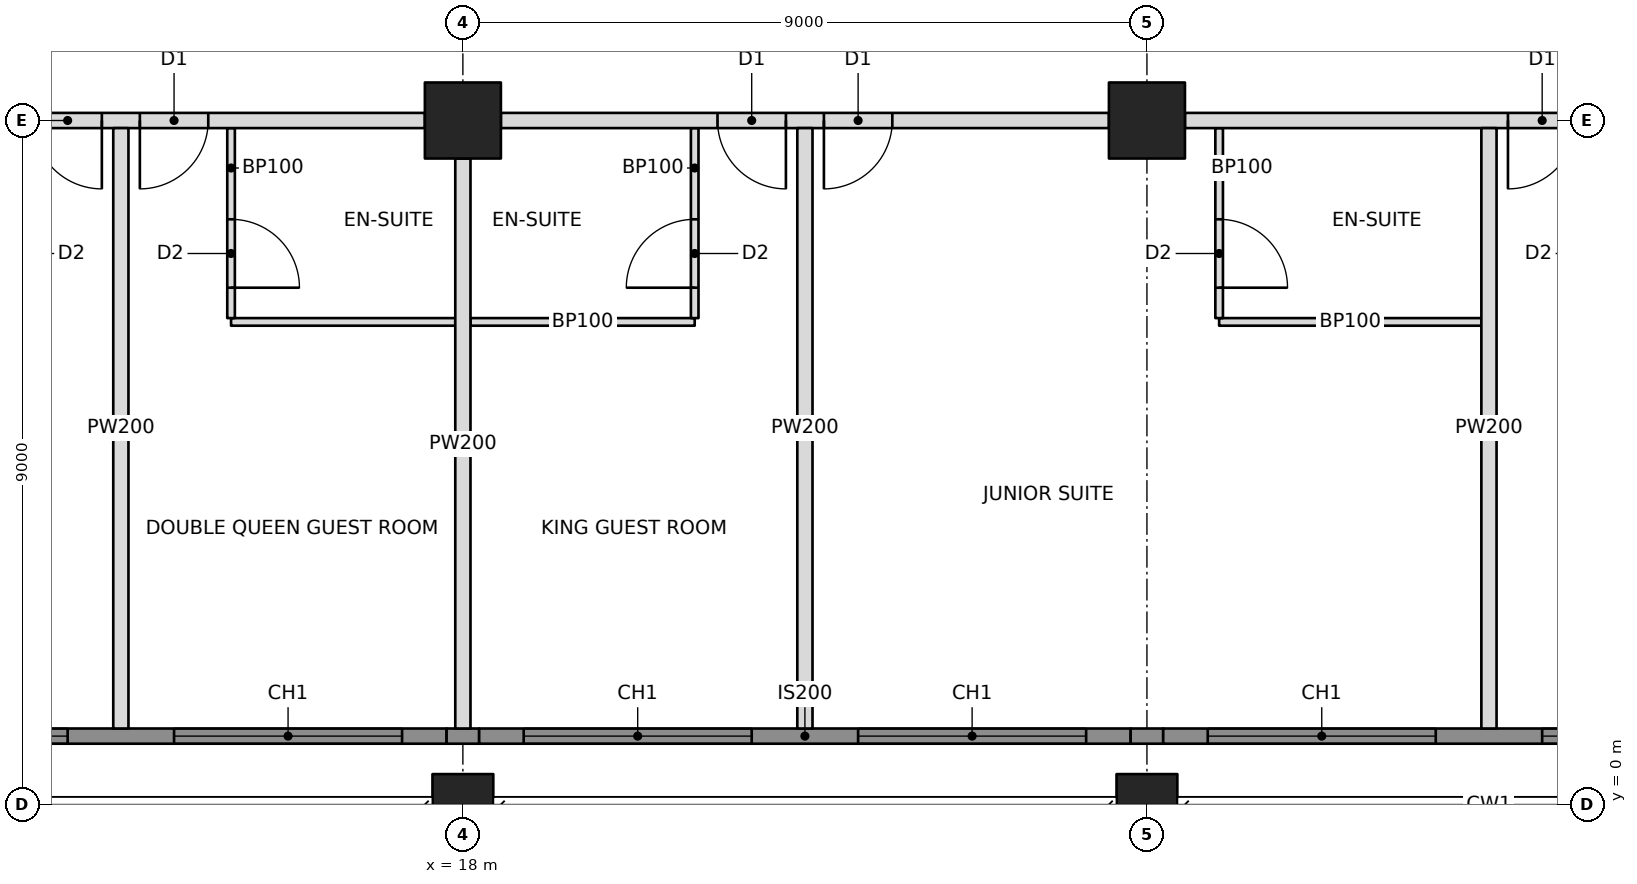
"""IFC4 building model, lengths in metres.
Left out: names, types, materials, properties, quantities, classifications, styles, units other than length and angle.
Written with IfcOpenShell. Run it as: python <this file> out.ifc"""

import sys

from ifc_helpers import new_model, si_unit, direction, frame, frame_2d, origin, origin_2d, place, context, subcontext, project, spatial, rectangle, hollow_rectangle, extrude, element, fill, save


model = new_model("IFC4")
c1 = context("Model", 3, precision=1e-05, world=origin(), true_north=direction((0.0, 1.0)))
c2 = subcontext(c1, "Body", "Model", "MODEL_VIEW")
j1 = project(units=[si_unit("LENGTHUNIT", "METRE"), si_unit("PLANEANGLEUNIT", "RADIAN")], contexts=[c1])
p1 = place(None, origin())
s1 = spatial("IfcSite", under=j1, at=p1, CompositionType="ELEMENT")
p2 = place(p1, origin())
s2 = spatial("IfcBuilding", under=s1, at=p2, CompositionType="ELEMENT")
p3 = place(p2, frame((0.0, 0.0, 85.8)))
s3 = spatial("IfcBuildingStorey", under=s2, at=p3, CompositionType="ELEMENT", Elevation=85.8)
p4 = place(p3, frame((18.0, 0.0, 0.0), z_axis=(0.0, 0.0, 1.0), x_axis=(1.0, 0.0, 0.0)))
e1 = element("IfcColumn", 1, at=p4, inside=s3, PredefinedType="COLUMN", context=c2, shape_type="SweptSolid", body=[
    extrude(hollow_rectangle(XDim=0.8, YDim=0.8, WallThickness=0.07, at=origin_2d()), origin(), (0.0, 0.0, 1.0), 3.4),
])
p5 = place(p3, frame((18.0, 9.0, 0.0), z_axis=(0.0, 0.0, 1.0), x_axis=(1.0, 0.0, 0.0)))
e2 = element("IfcColumn", 2, at=p5, inside=s3, PredefinedType="COLUMN", context=c2, shape_type="SweptSolid", body=[
    extrude(hollow_rectangle(XDim=1.0, YDim=1.0, WallThickness=0.1, at=origin_2d()), origin(), (0.0, 0.0, 1.0), 3.4),
])
p6 = place(p3, frame((27.0, 0.0, 0.0), z_axis=(0.0, 0.0, 1.0), x_axis=(1.0, 0.0, 0.0)))
e3 = element("IfcColumn", 3, at=p6, inside=s3, PredefinedType="COLUMN", context=c2, shape_type="SweptSolid", body=[
    extrude(hollow_rectangle(XDim=0.8, YDim=0.8, WallThickness=0.07, at=origin_2d()), origin(), (0.0, 0.0, 1.0), 3.4),
])
p7 = place(p3, frame((27.0, 9.0, 0.0), z_axis=(0.0, 0.0, 1.0), x_axis=(1.0, 0.0, 0.0)))
e4 = element("IfcColumn", 4, at=p7, inside=s3, PredefinedType="COLUMN", context=c2, shape_type="SweptSolid", body=[
    extrude(hollow_rectangle(XDim=1.0, YDim=1.0, WallThickness=0.1, at=origin_2d()), origin(), (0.0, 0.0, 1.0), 3.4),
])
p8 = place(p3, frame((9.5, 9.0, 0.0), z_axis=(0.0, 0.0, 1.0), x_axis=(1.0, 0.0, 0.0)))
e5 = element("IfcWall", 5, at=p8, inside=s3, PredefinedType="PARTITIONING", context=c2, shape_type="SweptSolid", body=[
    extrude(rectangle(XDim=8.0, YDim=0.2, at=frame_2d((4.0, 0.0))), origin(), (0.0, 0.0, 1.0), 2.21),
])
p9 = place(p8, frame((2.85, 0.0, 0.0)))
e6 = element("IfcOpeningElement", 6, at=p9, cuts=e5, PredefinedType="OPENING", context=c2, shape_type="SweptSolid", body=[
    extrude(rectangle(XDim=0.9, YDim=2.1, at=frame_2d((0.45, 1.05))), frame((0.0, 0.11, 0.0), z_axis=(0.0, -1.0, 0.0), x_axis=(1.0, 0.0, 0.0)), (0.0, 0.0, 1.0), 0.22),
])
p10 = place(p8, frame((4.25, 0.0, 0.0)))
e7 = element("IfcOpeningElement", 7, at=p10, cuts=e5, PredefinedType="OPENING", context=c2, shape_type="SweptSolid", body=[
    extrude(rectangle(XDim=0.9, YDim=2.1, at=frame_2d((0.45, 1.05))), frame((0.0, 0.11, 0.0), z_axis=(0.0, -1.0, 0.0), x_axis=(1.0, 0.0, 0.0)), (0.0, 0.0, 1.0), 0.22),
])
p11 = place(p3, frame((18.5, 9.0, 0.0), z_axis=(0.0, 0.0, 1.0), x_axis=(1.0, 0.0, 0.0)))
e8 = element("IfcWall", 8, at=p11, inside=s3, PredefinedType="PARTITIONING", context=c2, shape_type="SweptSolid", body=[
    extrude(rectangle(XDim=8.0, YDim=0.2, at=frame_2d((4.0, 0.0))), origin(), (0.0, 0.0, 1.0), 2.21),
])
p12 = place(p11, frame((2.85, 0.0, 0.0)))
e9 = element("IfcOpeningElement", 9, at=p12, cuts=e8, PredefinedType="OPENING", context=c2, shape_type="SweptSolid", body=[
    extrude(rectangle(XDim=0.9, YDim=2.1, at=frame_2d((0.45, 1.05))), frame((0.0, 0.11, 0.0), z_axis=(0.0, -1.0, 0.0), x_axis=(1.0, 0.0, 0.0)), (0.0, 0.0, 1.0), 0.22),
])
p13 = place(p11, frame((4.25, 0.0, 0.0)))
e10 = element("IfcOpeningElement", 10, at=p13, cuts=e8, PredefinedType="OPENING", context=c2, shape_type="SweptSolid", body=[
    extrude(rectangle(XDim=0.9, YDim=2.1, at=frame_2d((0.45, 1.05))), frame((0.0, 0.11, 0.0), z_axis=(0.0, -1.0, 0.0), x_axis=(1.0, 0.0, 0.0)), (0.0, 0.0, 1.0), 0.22),
])
p14 = place(p3, frame((27.5, 9.0, 0.0), z_axis=(0.0, 0.0, 1.0), x_axis=(1.0, 0.0, 0.0)))
e11 = element("IfcWall", 11, at=p14, inside=s3, PredefinedType="PARTITIONING", context=c2, shape_type="SweptSolid", body=[
    extrude(rectangle(XDim=8.0, YDim=0.2, at=frame_2d((4.0, 0.0))), origin(), (0.0, 0.0, 1.0), 2.21),
])
p15 = place(p14, frame((4.25, 0.0, 0.0)))
e12 = element("IfcOpeningElement", 12, at=p15, cuts=e11, PredefinedType="OPENING", context=c2, shape_type="SweptSolid", body=[
    extrude(rectangle(XDim=0.9, YDim=2.1, at=frame_2d((0.45, 1.05))), frame((0.0, 0.11, 0.0), z_axis=(0.0, -1.0, 0.0), x_axis=(1.0, 0.0, 0.0)), (0.0, 0.0, 1.0), 0.22),
])
p16 = place(p3, frame((13.5, 8.9, 0.0), z_axis=(0.0, 0.0, 1.0), x_axis=(0.0, -1.0, 0.0)))
e13 = element("IfcWall", 13, at=p16, inside=s3, PredefinedType="PARTITIONING", context=c2, shape_type="SweptSolid", body=[
    extrude(rectangle(XDim=7.9, YDim=0.2, at=frame_2d((3.95, 0.0))), origin(), (0.0, 0.0, 1.0), 2.21),
])
p17 = place(p3, frame((18.0, 8.5, 0.0), z_axis=(0.0, 0.0, 1.0), x_axis=(0.0, -1.0, 0.0)))
e14 = element("IfcWall", 14, at=p17, inside=s3, PredefinedType="PARTITIONING", context=c2, shape_type="SweptSolid", body=[
    extrude(rectangle(XDim=7.5, YDim=0.2, at=frame_2d((3.75, 0.0))), origin(), (0.0, 0.0, 1.0), 2.203),
])
for number, where, z_axis, x_axis in (
    (15, (22.5, 8.9, 0.0), (0.0, 0.0, 1.0), (0.0, -1.0, 0.0)),
    (16, (31.5, 8.9, 0.0), (0.0, 0.0, 1.0), (0.0, -1.0, 0.0)),
):
    element("IfcWall", number, at=place(p3, frame(where, z_axis=z_axis, x_axis=x_axis)), inside=s3, PredefinedType="PARTITIONING", context=c2, shape_type="SweptSolid", body=[
        extrude(rectangle(XDim=7.9, YDim=0.2, at=frame_2d((3.95, 0.0))), origin(), (0.0, 0.0, 1.0), 2.21),
    ])
p18 = place(p3, frame((14.95, 6.35, 0.0), z_axis=(0.0, 0.0, 1.0), x_axis=(1.0, 0.0, 0.0)))
e17 = element("IfcWall", 17, at=p18, inside=s3, PredefinedType="PARTITIONING", context=c2, shape_type="SweptSolid", body=[
    extrude(rectangle(XDim=2.95, YDim=0.1, at=frame_2d((1.475, 0.0))), origin(), (0.0, 0.0, 1.0), 2.202),
])
p19 = place(p3, frame((14.95, 8.9, 0.0), z_axis=(0.0, 0.0, 1.0), x_axis=(0.0, -1.0, 0.0)))
e18 = element("IfcWall", 18, at=p19, inside=s3, PredefinedType="PARTITIONING", context=c2, shape_type="SweptSolid", body=[
    extrude(rectangle(XDim=2.5, YDim=0.1, at=frame_2d((1.25, 0.0))), origin(), (0.0, 0.0, 1.0), 2.21),
])
p20 = place(p19, frame((1.2, 0.0, 0.0)))
e19 = element("IfcOpeningElement", 19, at=p20, cuts=e18, PredefinedType="OPENING", context=c2, shape_type="SweptSolid", body=[
    extrude(rectangle(XDim=0.9, YDim=2.1, at=frame_2d((0.45, 1.05))), frame((0.0, 0.06, 0.0), z_axis=(0.0, -1.0, 0.0), x_axis=(1.0, 0.0, 0.0)), (0.0, 0.0, 1.0), 0.12),
])
p21 = place(p3, frame((18.1, 6.35, 0.0), z_axis=(0.0, 0.0, 1.0), x_axis=(1.0, 0.0, 0.0)))
e20 = element("IfcWall", 20, at=p21, inside=s3, PredefinedType="PARTITIONING", context=c2, shape_type="SweptSolid", body=[
    extrude(rectangle(XDim=2.95, YDim=0.1, at=frame_2d((1.475, 0.0))), origin(), (0.0, 0.0, 1.0), 2.202),
])
p22 = place(p3, frame((21.05, 8.9, 0.0), z_axis=(0.0, 0.0, 1.0), x_axis=(0.0, -1.0, 0.0)))
e21 = element("IfcWall", 21, at=p22, inside=s3, PredefinedType="PARTITIONING", context=c2, shape_type="SweptSolid", body=[
    extrude(rectangle(XDim=2.5, YDim=0.1, at=frame_2d((1.25, 0.0))), origin(), (0.0, 0.0, 1.0), 2.21),
])
p23 = place(p22, frame((1.2, 0.0, 0.0)))
e22 = element("IfcOpeningElement", 22, at=p23, cuts=e21, PredefinedType="OPENING", context=c2, shape_type="SweptSolid", body=[
    extrude(rectangle(XDim=0.9, YDim=2.1, at=frame_2d((0.45, 1.05))), frame((0.0, 0.06, 0.0), z_axis=(0.0, -1.0, 0.0), x_axis=(1.0, 0.0, 0.0)), (0.0, 0.0, 1.0), 0.12),
])
p24 = place(p3, frame((27.95, 6.35, 0.0), z_axis=(0.0, 0.0, 1.0), x_axis=(1.0, 0.0, 0.0)))
e23 = element("IfcWall", 23, at=p24, inside=s3, PredefinedType="PARTITIONING", context=c2, shape_type="SweptSolid", body=[
    extrude(rectangle(XDim=3.45, YDim=0.1, at=frame_2d((1.725, 0.0))), origin(), (0.0, 0.0, 1.0), 3.15),
])
p25 = place(p3, frame((27.95, 8.9, 0.0), z_axis=(0.0, 0.0, 1.0), x_axis=(0.0, -1.0, 0.0)))
e24 = element("IfcWall", 24, at=p25, inside=s3, PredefinedType="PARTITIONING", context=c2, shape_type="SweptSolid", body=[
    extrude(rectangle(XDim=2.5, YDim=0.1, at=frame_2d((1.25, 0.0))), origin(), (0.0, 0.0, 1.0), 2.21),
])
p26 = place(p25, frame((1.2, 0.0, 0.0)))
e25 = element("IfcOpeningElement", 25, at=p26, cuts=e24, PredefinedType="OPENING", context=c2, shape_type="SweptSolid", body=[
    extrude(rectangle(XDim=0.9, YDim=2.1, at=frame_2d((0.45, 1.05))), frame((0.0, 0.06, 0.0), z_axis=(0.0, -1.0, 0.0), x_axis=(1.0, 0.0, 0.0)), (0.0, 0.0, 1.0), 0.12),
])
p27 = place(p3, frame((9.215, 0.9, 0.0), z_axis=(0.0, 0.0, 1.0), x_axis=(1.0, 0.0, 0.0)))
e26 = element("IfcWall", 26, at=p27, inside=s3, PredefinedType="SOLIDWALL", context=c2, shape_type="SweptSolid", body=[
    extrude(rectangle(XDim=8.571, YDim=0.2, at=frame_2d((4.285, 0.0))), origin(), (0.0, 0.0, 1.0), 3.15),
])
p28 = place(p27, frame((0.585, 0.0, 0.6)))
e27 = element("IfcOpeningElement", 27, at=p28, cuts=e26, PredefinedType="OPENING", context=c2, shape_type="SweptSolid", body=[
    extrude(rectangle(XDim=3.0, YDim=2.2, at=frame_2d((1.5, 1.1))), frame((0.0, 0.11, 0.0), z_axis=(0.0, -1.0, 0.0), x_axis=(1.0, 0.0, 0.0)), (0.0, 0.0, 1.0), 0.22),
])
p29 = place(p27, frame((4.985, 0.0, 0.6)))
e28 = element("IfcOpeningElement", 28, at=p29, cuts=e26, PredefinedType="OPENING", context=c2, shape_type="SweptSolid", body=[
    extrude(rectangle(XDim=3.0, YDim=2.2, at=frame_2d((1.5, 1.1))), frame((0.0, 0.11, 0.0), z_axis=(0.0, -1.0, 0.0), x_axis=(1.0, 0.0, 0.0)), (0.0, 0.0, 1.0), 0.22),
])
p30 = place(p3, frame((17.786, 0.9, 0.0), z_axis=(0.0, 0.0, 1.0), x_axis=(1.0, 0.0, 0.0)))
e29 = element("IfcWall", 29, at=p30, inside=s3, PredefinedType="SOLIDWALL", context=c2, shape_type="SweptSolid", body=[
    extrude(rectangle(XDim=0.428, YDim=0.2, at=frame_2d((0.214, 0.0))), origin(), (0.0, 0.0, 1.0), 2.202),
])
p31 = place(p3, frame((18.214, 0.9, 0.0), z_axis=(0.0, 0.0, 1.0), x_axis=(1.0, 0.0, 0.0)))
e30 = element("IfcWall", 30, at=p31, inside=s3, PredefinedType="SOLIDWALL", context=c2, shape_type="SweptSolid", body=[
    extrude(rectangle(XDim=8.572, YDim=0.2, at=frame_2d((4.286, 0.0))), origin(), (0.0, 0.0, 1.0), 3.15),
])
p32 = place(p31, frame((0.586, 0.0, 0.6)))
e31 = element("IfcOpeningElement", 31, at=p32, cuts=e30, PredefinedType="OPENING", context=c2, shape_type="SweptSolid", body=[
    extrude(rectangle(XDim=3.0, YDim=2.2, at=frame_2d((1.5, 1.1))), frame((0.0, 0.11, 0.0), z_axis=(0.0, -1.0, 0.0), x_axis=(1.0, 0.0, 0.0)), (0.0, 0.0, 1.0), 0.22),
])
p33 = place(p31, frame((4.986, 0.0, 0.6)))
e32 = element("IfcOpeningElement", 32, at=p33, cuts=e30, PredefinedType="OPENING", context=c2, shape_type="SweptSolid", body=[
    extrude(rectangle(XDim=3.0, YDim=2.2, at=frame_2d((1.5, 1.1))), frame((0.0, 0.11, 0.0), z_axis=(0.0, -1.0, 0.0), x_axis=(1.0, 0.0, 0.0)), (0.0, 0.0, 1.0), 0.22),
])
p34 = place(p3, frame((26.786, 0.9, 0.0), z_axis=(0.0, 0.0, 1.0), x_axis=(1.0, 0.0, 0.0)))
e33 = element("IfcWall", 33, at=p34, inside=s3, PredefinedType="SOLIDWALL", context=c2, shape_type="SweptSolid", body=[
    extrude(rectangle(XDim=0.428, YDim=0.2, at=frame_2d((0.214, 0.0))), origin(), (0.0, 0.0, 1.0), 2.202),
])
p35 = place(p3, frame((27.214, 0.9, 0.0), z_axis=(0.0, 0.0, 1.0), x_axis=(1.0, 0.0, 0.0)))
e34 = element("IfcWall", 34, at=p35, inside=s3, PredefinedType="SOLIDWALL", context=c2, shape_type="SweptSolid", body=[
    extrude(rectangle(XDim=8.571, YDim=0.2, at=frame_2d((4.285, 0.0))), origin(), (0.0, 0.0, 1.0), 3.15),
])
p36 = place(p35, frame((0.586, 0.0, 0.6)))
e35 = element("IfcOpeningElement", 35, at=p36, cuts=e34, PredefinedType="OPENING", context=c2, shape_type="SweptSolid", body=[
    extrude(rectangle(XDim=3.0, YDim=2.2, at=frame_2d((1.5, 1.1))), frame((0.0, 0.11, 0.0), z_axis=(0.0, -1.0, 0.0), x_axis=(1.0, 0.0, 0.0)), (0.0, 0.0, 1.0), 0.22),
])
p37 = place(p35, frame((4.986, 0.0, 0.6)))
e36 = element("IfcOpeningElement", 36, at=p37, cuts=e34, PredefinedType="OPENING", context=c2, shape_type="SweptSolid", body=[
    extrude(rectangle(XDim=3.0, YDim=2.2, at=frame_2d((1.5, 1.1))), frame((0.0, 0.11, 0.0), z_axis=(0.0, -1.0, 0.0), x_axis=(1.0, 0.0, 0.0)), (0.0, 0.0, 1.0), 0.22),
])
p38 = place(p28, origin())
e37 = element("IfcWindow", 37, at=p38, inside=s3, PartitioningType="TRIPLE_PANEL_VERTICAL", PredefinedType="WINDOW", context=c2, shape_type="SweptSolid", body=[
    extrude(rectangle(XDim=3.0, YDim=2.2, at=frame_2d((1.5, 1.1))), frame((0.0, 0.03, 0.0), z_axis=(0.0, -1.0, 0.0), x_axis=(1.0, 0.0, 0.0)), (0.0, 0.0, 1.0), 0.06),
])
fill(e27, e37)
p39 = place(p29, origin())
e38 = element("IfcWindow", 38, at=p39, inside=s3, PartitioningType="TRIPLE_PANEL_VERTICAL", PredefinedType="WINDOW", context=c2, shape_type="SweptSolid", body=[
    extrude(rectangle(XDim=3.0, YDim=2.2, at=frame_2d((1.5, 1.1))), frame((0.0, 0.03, 0.0), z_axis=(0.0, -1.0, 0.0), x_axis=(1.0, 0.0, 0.0)), (0.0, 0.0, 1.0), 0.06),
])
fill(e28, e38)
p40 = place(p32, origin())
e39 = element("IfcWindow", 39, at=p40, inside=s3, PartitioningType="TRIPLE_PANEL_VERTICAL", PredefinedType="WINDOW", context=c2, shape_type="SweptSolid", body=[
    extrude(rectangle(XDim=3.0, YDim=2.2, at=frame_2d((1.5, 1.1))), frame((0.0, 0.03, 0.0), z_axis=(0.0, -1.0, 0.0), x_axis=(1.0, 0.0, 0.0)), (0.0, 0.0, 1.0), 0.06),
])
fill(e31, e39)
p41 = place(p33, origin())
e40 = element("IfcWindow", 40, at=p41, inside=s3, PartitioningType="TRIPLE_PANEL_VERTICAL", PredefinedType="WINDOW", context=c2, shape_type="SweptSolid", body=[
    extrude(rectangle(XDim=3.0, YDim=2.2, at=frame_2d((1.5, 1.1))), frame((0.0, 0.03, 0.0), z_axis=(0.0, -1.0, 0.0), x_axis=(1.0, 0.0, 0.0)), (0.0, 0.0, 1.0), 0.06),
])
fill(e32, e40)
p42 = place(p36, origin())
e41 = element("IfcWindow", 41, at=p42, inside=s3, PartitioningType="TRIPLE_PANEL_VERTICAL", PredefinedType="WINDOW", context=c2, shape_type="SweptSolid", body=[
    extrude(rectangle(XDim=3.0, YDim=2.2, at=frame_2d((1.5, 1.1))), frame((0.0, 0.03, 0.0), z_axis=(0.0, -1.0, 0.0), x_axis=(1.0, 0.0, 0.0)), (0.0, 0.0, 1.0), 0.06),
])
fill(e35, e41)
p43 = place(p37, origin())
e42 = element("IfcWindow", 42, at=p43, inside=s3, PartitioningType="TRIPLE_PANEL_VERTICAL", PredefinedType="WINDOW", context=c2, shape_type="SweptSolid", body=[
    extrude(rectangle(XDim=3.0, YDim=2.2, at=frame_2d((1.5, 1.1))), frame((0.0, 0.03, 0.0), z_axis=(0.0, -1.0, 0.0), x_axis=(1.0, 0.0, 0.0)), (0.0, 0.0, 1.0), 0.06),
])
fill(e36, e42)
p44 = place(p9, frame((0.9, 0.0, 0.0), z_axis=(0.0, 0.0, 1.0), x_axis=(-1.0, 0.0, 0.0)))
e43 = element("IfcDoor", 43, at=p44, inside=s3, OperationType="SINGLE_SWING_LEFT", PredefinedType="DOOR", context=c2, shape_type="SweptSolid", body=[
    extrude(rectangle(XDim=0.9, YDim=2.1, at=frame_2d((0.45, 1.05))), frame((0.0, 0.025, 0.0), z_axis=(0.0, -1.0, 0.0), x_axis=(1.0, 0.0, 0.0)), (0.0, 0.0, 1.0), 0.05),
])
fill(e6, e43)
p45 = place(p20, origin())
e44 = element("IfcDoor", 44, at=p45, inside=s3, OperationType="SINGLE_SWING_RIGHT", PredefinedType="DOOR", context=c2, shape_type="SweptSolid", body=[
    extrude(rectangle(XDim=0.9, YDim=2.1, at=frame_2d((0.45, 1.05))), frame((0.0, 0.025, 0.0), z_axis=(0.0, -1.0, 0.0), x_axis=(1.0, 0.0, 0.0)), (0.0, 0.0, 1.0), 0.05),
])
fill(e19, e44)
p46 = place(p10, frame((0.9, 0.0, 0.0), z_axis=(0.0, 0.0, 1.0), x_axis=(-1.0, 0.0, 0.0)))
e45 = element("IfcDoor", 45, at=p46, inside=s3, OperationType="SINGLE_SWING_RIGHT", PredefinedType="DOOR", context=c2, shape_type="SweptSolid", body=[
    extrude(rectangle(XDim=0.9, YDim=2.1, at=frame_2d((0.45, 1.05))), frame((0.0, 0.025, 0.0), z_axis=(0.0, -1.0, 0.0), x_axis=(1.0, 0.0, 0.0)), (0.0, 0.0, 1.0), 0.05),
])
fill(e7, e45)
p47 = place(p23, frame((0.9, 0.0, 0.0), z_axis=(0.0, 0.0, 1.0), x_axis=(-1.0, 0.0, 0.0)))
e46 = element("IfcDoor", 46, at=p47, inside=s3, OperationType="SINGLE_SWING_LEFT", PredefinedType="DOOR", context=c2, shape_type="SweptSolid", body=[
    extrude(rectangle(XDim=0.9, YDim=2.1, at=frame_2d((0.45, 1.05))), frame((0.0, 0.025, 0.0), z_axis=(0.0, -1.0, 0.0), x_axis=(1.0, 0.0, 0.0)), (0.0, 0.0, 1.0), 0.05),
])
fill(e22, e46)
p48 = place(p12, frame((0.9, 0.0, 0.0), z_axis=(0.0, 0.0, 1.0), x_axis=(-1.0, 0.0, 0.0)))
e47 = element("IfcDoor", 47, at=p48, inside=s3, OperationType="SINGLE_SWING_LEFT", PredefinedType="DOOR", context=c2, shape_type="SweptSolid", body=[
    extrude(rectangle(XDim=0.9, YDim=2.1, at=frame_2d((0.45, 1.05))), frame((0.0, 0.025, 0.0), z_axis=(0.0, -1.0, 0.0), x_axis=(1.0, 0.0, 0.0)), (0.0, 0.0, 1.0), 0.05),
])
fill(e9, e47)
p49 = place(p26, origin())
e48 = element("IfcDoor", 48, at=p49, inside=s3, OperationType="SINGLE_SWING_RIGHT", PredefinedType="DOOR", context=c2, shape_type="SweptSolid", body=[
    extrude(rectangle(XDim=0.9, YDim=2.1, at=frame_2d((0.45, 1.05))), frame((0.0, 0.025, 0.0), z_axis=(0.0, -1.0, 0.0), x_axis=(1.0, 0.0, 0.0)), (0.0, 0.0, 1.0), 0.05),
])
fill(e25, e48)
p50 = place(p13, frame((0.9, 0.0, 0.0), z_axis=(0.0, 0.0, 1.0), x_axis=(-1.0, 0.0, 0.0)))
e49 = element("IfcDoor", 49, at=p50, inside=s3, OperationType="SINGLE_SWING_RIGHT", PredefinedType="DOOR", context=c2, shape_type="SweptSolid", body=[
    extrude(rectangle(XDim=0.9, YDim=2.1, at=frame_2d((0.45, 1.05))), frame((0.0, 0.025, 0.0), z_axis=(0.0, -1.0, 0.0), x_axis=(1.0, 0.0, 0.0)), (0.0, 0.0, 1.0), 0.05),
])
fill(e10, e49)
p51 = place(p15, frame((0.9, 0.0, 0.0), z_axis=(0.0, 0.0, 1.0), x_axis=(-1.0, 0.0, 0.0)))
e50 = element("IfcDoor", 50, at=p51, inside=s3, OperationType="SINGLE_SWING_RIGHT", PredefinedType="DOOR", context=c2, shape_type="SweptSolid", body=[
    extrude(rectangle(XDim=0.9, YDim=2.1, at=frame_2d((0.45, 1.05))), frame((0.0, 0.025, 0.0), z_axis=(0.0, -1.0, 0.0), x_axis=(1.0, 0.0, 0.0)), (0.0, 0.0, 1.0), 0.05),
])
fill(e12, e50)
save(model, sys.argv[1])
